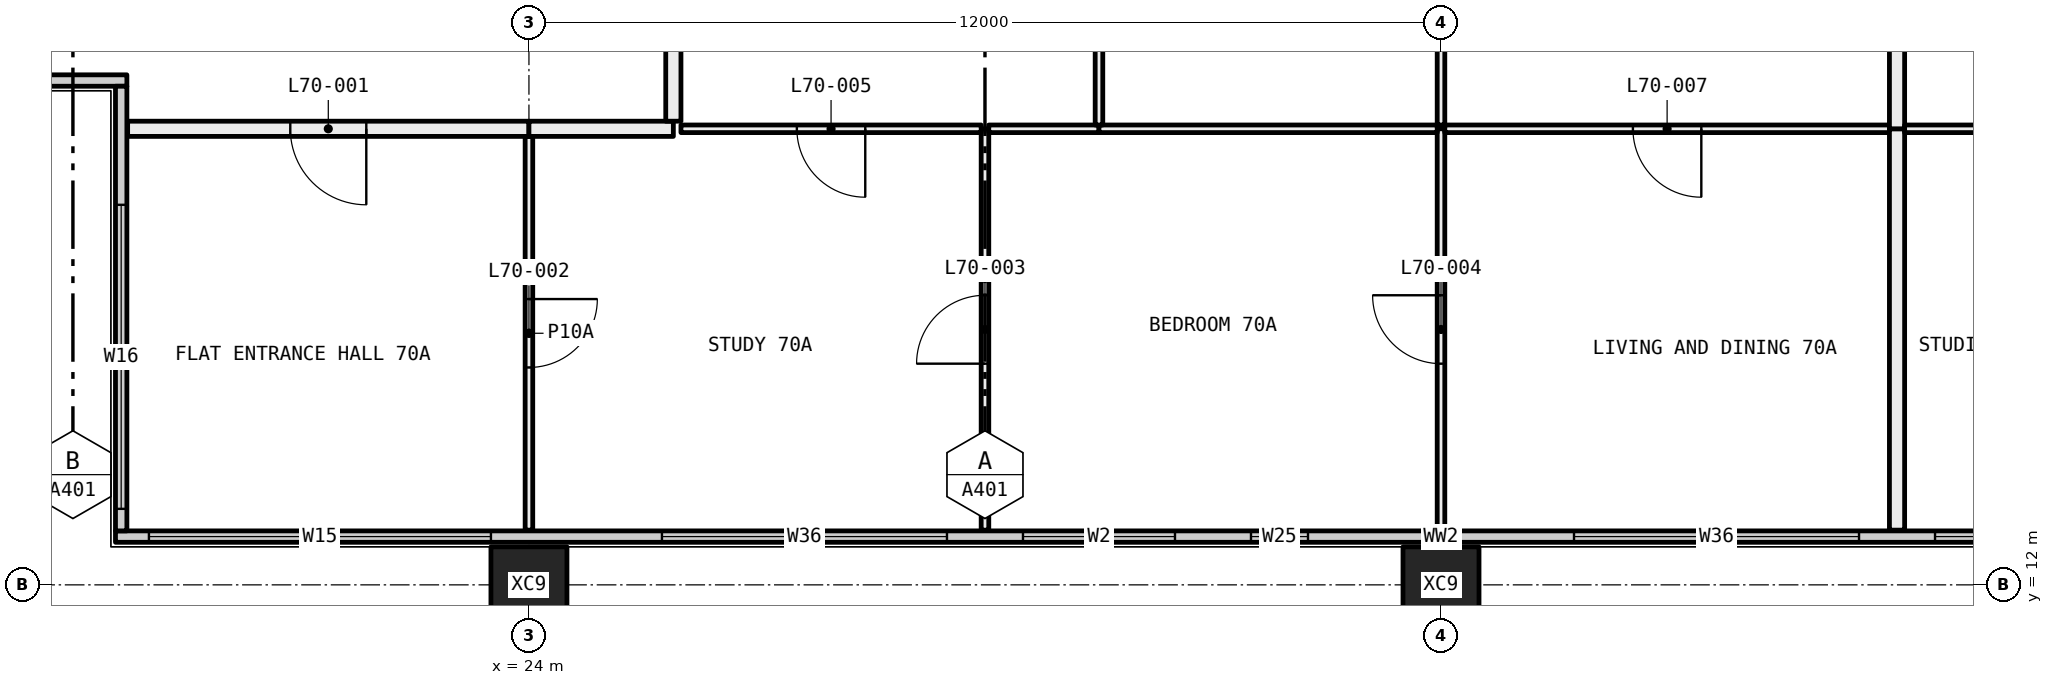
"""IFC4 building model, lengths in metres.
Left out: names, types, materials, properties, quantities, classifications, styles, units other than length and angle.
Written with IfcOpenShell. Run it as: python <this file> out.ifc"""

import sys

from ifc_helpers import new_model, si_unit, direction, frame, frame_2d, origin, origin_2d, place, context, subcontext, project, spatial, rectangle, hollow_rectangle, extrude, element, fill, save


model = new_model("IFC4")
c1 = context("Model", 3, precision=1e-05, world=origin(), true_north=direction((0.0, 1.0)))
c2 = subcontext(c1, "Body", "Model", "MODEL_VIEW")
j1 = project(units=[si_unit("LENGTHUNIT", "METRE"), si_unit("PLANEANGLEUNIT", "RADIAN")], contexts=[c1])
p1 = place(None, origin())
s1 = spatial("IfcSite", under=j1, at=p1, CompositionType="ELEMENT")
p2 = place(p1, origin())
s2 = spatial("IfcBuilding", under=s1, at=p2, CompositionType="ELEMENT")
p3 = place(p2, frame((0.0, 0.0, 259.35)))
s3 = spatial("IfcBuildingStorey", under=s2, at=p3, CompositionType="ELEMENT", Elevation=259.35)
for number, where, z_axis, x_axis in (
    (1, (24.0, 12.0, -0.4), (0.0, 0.0, 1.0), (1.0, 0.0, 0.0)),
    (2, (36.0, 12.0, -0.4), (0.0, 0.0, 1.0), (1.0, 0.0, 0.0)),
):
    element("IfcColumn", number, at=place(p3, frame(where, z_axis=z_axis, x_axis=x_axis)), inside=s3, PredefinedType="COLUMN", context=c2, shape_type="SweptSolid", body=[
        extrude(hollow_rectangle(XDim=1.0, YDim=1.0, WallThickness=0.036, at=origin_2d()), origin(), (0.0, 0.0, 1.0), 3.45),
    ])
p4 = place(p3, frame((18.56, 12.635, 0.0), z_axis=(0.0, 0.0, 1.0), x_axis=(1.0, 0.0, 0.0)))
e3 = element("IfcWall", 3, at=p4, inside=s3, PredefinedType="ELEMENTEDWALL", context=c2, shape_type="SweptSolid", body=[
    extrude(rectangle(XDim=34.88, YDim=0.15, at=frame_2d((17.44, 0.0))), origin(), (0.0, 0.0, 1.0), 3.05),
])
p5 = place(p4, frame((0.44, 0.0, 0.45)))
e4 = element("IfcOpeningElement", 4, at=p5, cuts=e3, PredefinedType="OPENING", context=c2, shape_type="SweptSolid", body=[
    extrude(rectangle(XDim=4.5, YDim=2.55, at=frame_2d((2.25, 1.275))), frame((0.0, 0.085, 0.0), z_axis=(0.0, -1.0, 0.0), x_axis=(1.0, 0.0, 0.0)), (0.0, 0.0, 1.0), 0.17),
])
p6 = place(p4, frame((7.19, 0.0, 0.45)))
e5 = element("IfcOpeningElement", 5, at=p6, cuts=e3, PredefinedType="OPENING", context=c2, shape_type="SweptSolid", body=[
    extrude(rectangle(XDim=3.75, YDim=2.55, at=frame_2d((1.875, 1.275))), frame((0.0, 0.085, 0.0), z_axis=(0.0, -1.0, 0.0), x_axis=(1.0, 0.0, 0.0)), (0.0, 0.0, 1.0), 0.17),
])
p7 = place(p4, frame((11.94, 0.0, 0.45)))
e6 = element("IfcOpeningElement", 6, at=p7, cuts=e3, PredefinedType="OPENING", context=c2, shape_type="SweptSolid", body=[
    extrude(rectangle(XDim=2.0, YDim=2.55, at=frame_2d((1.0, 1.275))), frame((0.0, 0.085, 0.0), z_axis=(0.0, -1.0, 0.0), x_axis=(1.0, 0.0, 0.0)), (0.0, 0.0, 1.0), 0.17),
])
p8 = place(p4, frame((14.94, 0.0, 0.45)))
e7 = element("IfcOpeningElement", 7, at=p8, cuts=e3, PredefinedType="OPENING", context=c2, shape_type="SweptSolid", body=[
    extrude(rectangle(XDim=0.75, YDim=2.55, at=frame_2d((0.375, 1.275))), frame((0.0, 0.085, 0.0), z_axis=(0.0, -1.0, 0.0), x_axis=(1.0, 0.0, 0.0)), (0.0, 0.0, 1.0), 0.17),
])
p9 = place(p4, frame((19.19, 0.0, 0.45)))
e8 = element("IfcOpeningElement", 8, at=p9, cuts=e3, PredefinedType="OPENING", context=c2, shape_type="SweptSolid", body=[
    extrude(rectangle(XDim=3.75, YDim=2.55, at=frame_2d((1.875, 1.275))), frame((0.0, 0.085, 0.0), z_axis=(0.0, -1.0, 0.0), x_axis=(1.0, 0.0, 0.0)), (0.0, 0.0, 1.0), 0.17),
])
p10 = place(p4, frame((23.94, 0.0, 0.45)))
e9 = element("IfcOpeningElement", 9, at=p10, cuts=e3, PredefinedType="OPENING", context=c2, shape_type="SweptSolid", body=[
    extrude(rectangle(XDim=3.75, YDim=2.55, at=frame_2d((1.875, 1.275))), frame((0.0, 0.085, 0.0), z_axis=(0.0, -1.0, 0.0), x_axis=(1.0, 0.0, 0.0)), (0.0, 0.0, 1.0), 0.17),
])
p11 = place(p4, frame((29.94, 0.0, 0.45)))
e10 = element("IfcOpeningElement", 10, at=p11, cuts=e3, PredefinedType="OPENING", context=c2, shape_type="SweptSolid", body=[
    extrude(rectangle(XDim=4.5, YDim=2.55, at=frame_2d((2.25, 1.275))), frame((0.0, 0.085, 0.0), z_axis=(0.0, -1.0, 0.0), x_axis=(1.0, 0.0, 0.0)), (0.0, 0.0, 1.0), 0.17),
])
p12 = place(p3, frame((12.56, 18.635, 0.0), z_axis=(0.0, 0.0, 1.0), x_axis=(1.0, 0.0, 0.0)))
e11 = element("IfcWall", 11, at=p12, inside=s3, PredefinedType="ELEMENTEDWALL", context=c2, shape_type="SweptSolid", body=[
    extrude(rectangle(XDim=6.15, YDim=0.15, at=frame_2d((3.075, 0.0))), origin(), (0.0, 0.0, 1.0), 3.05),
])
p13 = place(p12, frame((0.44, 0.0, 0.45)))
e12 = element("IfcOpeningElement", 12, at=p13, cuts=e11, PredefinedType="OPENING", context=c2, shape_type="SweptSolid", body=[
    extrude(rectangle(XDim=4.0, YDim=2.55, at=frame_2d((2.0, 1.275))), frame((0.0, 0.085, 0.0), z_axis=(0.0, -1.0, 0.0), x_axis=(1.0, 0.0, 0.0)), (0.0, 0.0, 1.0), 0.17),
])
p14 = place(p3, frame((18.635, 12.71, 0.0), z_axis=(0.0, 0.0, 1.0), x_axis=(0.0, 1.0, 0.0)))
e13 = element("IfcWall", 13, at=p14, inside=s3, PredefinedType="ELEMENTEDWALL", context=c2, shape_type="SweptSolid", body=[
    extrude(rectangle(XDim=5.85, YDim=0.15, at=frame_2d((2.925, 0.0))), origin(), (0.0, 0.0, 1.0), 3.05),
])
p15 = place(p14, frame((0.29, 0.0, 0.45)))
e14 = element("IfcOpeningElement", 14, at=p15, cuts=e13, PredefinedType="OPENING", context=c2, shape_type="SweptSolid", body=[
    extrude(rectangle(XDim=4.0, YDim=2.55, at=frame_2d((2.0, 1.275))), frame((0.0, 0.085, 0.0), z_axis=(0.0, -1.0, 0.0), x_axis=(1.0, 0.0, 0.0)), (0.0, 0.0, 1.0), 0.17),
])
p16 = place(p3, frame((24.0, 12.72, 0.0), z_axis=(0.0, 0.0, 1.0), x_axis=(0.0, 1.0, 0.0)))
e15 = element("IfcWall", 15, at=p16, inside=s3, PredefinedType="PARTITIONING", context=c2, shape_type="SweptSolid", body=[
    extrude(rectangle(XDim=5.18, YDim=0.1, at=frame_2d((2.59, 0.0))), origin(), (0.0, 0.0, 1.0), 3.05),
])
p17 = place(p16, frame((2.14, 0.0, 0.0)))
e16 = element("IfcOpeningElement", 16, at=p17, cuts=e15, PredefinedType="OPENING", context=c2, shape_type="SweptSolid", body=[
    extrude(rectangle(XDim=0.9, YDim=2.1, at=frame_2d((0.45, 1.05))), frame((0.0, 0.06, 0.0), z_axis=(0.0, -1.0, 0.0), x_axis=(1.0, 0.0, 0.0)), (0.0, 0.0, 1.0), 0.12),
])
p18 = place(p3, frame((24.0, 18.0, 0.0), z_axis=(0.0, 0.0, 1.0), x_axis=(-1.0, 0.0, 0.0)))
e17 = element("IfcWall", 17, at=p18, inside=s3, PredefinedType="PARTITIONING", context=c2, shape_type="SweptSolid", body=[
    extrude(rectangle(XDim=5.28, YDim=0.2, at=frame_2d((2.64, 0.0))), origin(), (0.0, 0.0, 1.0), 3.05),
])
p19 = place(p18, frame((2.14, 0.0, 0.0)))
e18 = element("IfcOpeningElement", 18, at=p19, cuts=e17, PredefinedType="OPENING", context=c2, shape_type="SweptSolid", body=[
    extrude(rectangle(XDim=1.0, YDim=2.1, at=frame_2d((0.5, 1.05))), frame((0.0, 0.11, 0.0), z_axis=(0.0, -1.0, 0.0), x_axis=(1.0, 0.0, 0.0)), (0.0, 0.0, 1.0), 0.22),
])
p20 = place(p3, frame((30.0, 12.72, 0.0), z_axis=(0.0, 0.0, 1.0), x_axis=(0.0, 1.0, 0.0)))
e19 = element("IfcWall", 19, at=p20, inside=s3, PredefinedType="PARTITIONING", context=c2, shape_type="SweptSolid", body=[
    extrude(rectangle(XDim=5.28, YDim=0.1, at=frame_2d((2.64, 0.0))), origin(), (0.0, 0.0, 1.0), 3.05),
])
p21 = place(p20, frame((2.19, 0.0, 0.0)))
e20 = element("IfcOpeningElement", 20, at=p21, cuts=e19, PredefinedType="OPENING", context=c2, shape_type="SweptSolid", body=[
    extrude(rectangle(XDim=0.9, YDim=2.1, at=frame_2d((0.45, 1.05))), frame((0.0, 0.06, 0.0), z_axis=(0.0, -1.0, 0.0), x_axis=(1.0, 0.0, 0.0)), (0.0, 0.0, 1.0), 0.12),
])
p22 = place(p3, frame((29.95, 18.0, 0.0), z_axis=(0.0, 0.0, 1.0), x_axis=(-1.0, 0.0, 0.0)))
e21 = element("IfcWall", 21, at=p22, inside=s3, PredefinedType="PARTITIONING", context=c2, shape_type="SweptSolid", body=[
    extrude(rectangle(XDim=3.95, YDim=0.1, at=frame_2d((1.975, 0.0))), origin(), (0.0, 0.0, 1.0), 3.05),
])
p23 = place(p22, frame((1.525, 0.0, 0.0)))
e22 = element("IfcOpeningElement", 22, at=p23, cuts=e21, PredefinedType="OPENING", context=c2, shape_type="SweptSolid", body=[
    extrude(rectangle(XDim=0.9, YDim=2.1, at=frame_2d((0.45, 1.05))), frame((0.0, 0.06, 0.0), z_axis=(0.0, -1.0, 0.0), x_axis=(1.0, 0.0, 0.0)), (0.0, 0.0, 1.0), 0.12),
])
p24 = place(p3, frame((25.9, 18.0, 0.0), z_axis=(0.0, 0.0, 1.0), x_axis=(-1.0, 0.0, 0.0)))
e23 = element("IfcWall", 23, at=p24, inside=s3, PredefinedType="PARTITIONING", context=c2, shape_type="SweptSolid", body=[
    extrude(rectangle(XDim=1.9, YDim=0.2, at=frame_2d((0.95, 0.0))), origin(), (0.0, 0.0, 1.0), 3.05),
])
p25 = place(p3, frame((36.0, 12.72, 0.0), z_axis=(0.0, 0.0, 1.0), x_axis=(0.0, 1.0, 0.0)))
e24 = element("IfcWall", 24, at=p25, inside=s3, PredefinedType="PARTITIONING", context=c2, shape_type="SweptSolid", body=[
    extrude(rectangle(XDim=5.28, YDim=0.1, at=frame_2d((2.64, 0.0))), origin(), (0.0, 0.0, 1.0), 2.45),
])
p26 = place(p25, frame((2.19, 0.0, 0.0)))
e25 = element("IfcOpeningElement", 25, at=p26, cuts=e24, PredefinedType="OPENING", context=c2, shape_type="SweptSolid", body=[
    extrude(rectangle(XDim=0.9, YDim=2.1, at=frame_2d((0.45, 1.05))), frame((0.0, 0.06, 0.0), z_axis=(0.0, -1.0, 0.0), x_axis=(1.0, 0.0, 0.0)), (0.0, 0.0, 1.0), 0.12),
])
p27 = place(p3, frame((31.5, 18.0, 0.0), z_axis=(0.0, 0.0, 1.0), x_axis=(-1.0, 0.0, 0.0)))
e26 = element("IfcWall", 26, at=p27, inside=s3, PredefinedType="PARTITIONING", context=c2, shape_type="SweptSolid", body=[
    extrude(rectangle(XDim=1.45, YDim=0.1, at=frame_2d((0.725, 0.0))), origin(), (0.0, 0.0, 1.0), 3.05),
])
p28 = place(p3, frame((35.95, 18.0, 0.0), z_axis=(0.0, 0.0, 1.0), x_axis=(-1.0, 0.0, 0.0)))
e27 = element("IfcWall", 27, at=p28, inside=s3, PredefinedType="PARTITIONING", context=c2, shape_type="SweptSolid", body=[
    extrude(rectangle(XDim=4.45, YDim=0.1, at=frame_2d((2.225, 0.0))), origin(), (0.0, 0.0, 1.0), 2.45),
])
p29 = place(p3, frame((41.9, 18.0, 0.0), z_axis=(0.0, 0.0, 1.0), x_axis=(-1.0, 0.0, 0.0)))
e28 = element("IfcWall", 28, at=p29, inside=s3, PredefinedType="PARTITIONING", context=c2, shape_type="SweptSolid", body=[
    extrude(rectangle(XDim=5.85, YDim=0.1, at=frame_2d((2.925, 0.0))), origin(), (0.0, 0.0, 1.0), 2.45),
])
p30 = place(p29, frame((2.475, 0.0, 0.0)))
e29 = element("IfcOpeningElement", 29, at=p30, cuts=e28, PredefinedType="OPENING", context=c2, shape_type="SweptSolid", body=[
    extrude(rectangle(XDim=0.9, YDim=2.1, at=frame_2d((0.45, 1.05))), frame((0.0, 0.06, 0.0), z_axis=(0.0, -1.0, 0.0), x_axis=(1.0, 0.0, 0.0)), (0.0, 0.0, 1.0), 0.12),
])
p31 = place(p3, frame((42.0, 12.72, 0.0), z_axis=(0.0, 0.0, 1.0), x_axis=(0.0, 1.0, 0.0)))
e30 = element("IfcWall", 30, at=p31, inside=s3, PredefinedType="PARTITIONING", context=c2, shape_type="SweptSolid", body=[
    extrude(rectangle(XDim=5.28, YDim=0.2, at=frame_2d((2.64, 0.0))), origin(), (0.0, 0.0, 1.0), 3.05),
])
p32 = place(p3, frame((31.5, 18.05, 0.0), z_axis=(0.0, 0.0, 1.0), x_axis=(0.0, 1.0, 0.0)))
e31 = element("IfcWall", 31, at=p32, inside=s3, PredefinedType="PARTITIONING", context=c2, shape_type="SweptSolid", body=[
    extrude(rectangle(XDim=6.25, YDim=0.1, at=frame_2d((3.125, 0.0))), origin(), (0.0, 0.0, 1.0), 2.45),
])
p33 = place(p32, frame((2.675, 0.0, 0.0)))
e32 = element("IfcOpeningElement", 32, at=p33, cuts=e31, PredefinedType="OPENING", context=c2, shape_type="SweptSolid", body=[
    extrude(rectangle(XDim=0.9, YDim=2.1, at=frame_2d((0.45, 1.05))), frame((0.0, 0.06, 0.0), z_axis=(0.0, -1.0, 0.0), x_axis=(1.0, 0.0, 0.0)), (0.0, 0.0, 1.0), 0.12),
])
p34 = place(p3, frame((25.9, 23.9, 0.0), z_axis=(0.0, 0.0, 1.0), x_axis=(0.0, -1.0, 0.0)))
e33 = element("IfcWall", 33, at=p34, inside=s3, PredefinedType="PARTITIONING", context=c2, shape_type="SweptSolid", body=[
    extrude(rectangle(XDim=5.8, YDim=0.2, at=frame_2d((2.9, 0.0))), origin(), (0.0, 0.0, 1.0), 3.05),
])
p35 = place(p3, frame((36.0, 18.05, 0.0), z_axis=(0.0, 0.0, 1.0), x_axis=(0.0, 1.0, 0.0)))
e34 = element("IfcWall", 34, at=p35, inside=s3, PredefinedType="PARTITIONING", context=c2, shape_type="SweptSolid", body=[
    extrude(rectangle(XDim=5.4, YDim=0.1, at=frame_2d((2.7, 0.0))), origin(), (0.0, 0.0, 1.0), 2.45),
])
p36 = place(p3, frame((42.0, 18.0, 0.0), z_axis=(0.0, 0.0, 1.0), x_axis=(0.0, 1.0, 0.0)))
e35 = element("IfcWall", 35, at=p36, inside=s3, PredefinedType="PARTITIONING", context=c2, shape_type="SweptSolid", body=[
    extrude(rectangle(XDim=6.3, YDim=0.2, at=frame_2d((3.15, 0.0))), origin(), (0.0, 0.0, 1.0), 2.45),
])
p37 = place(p3, frame((46.0, 18.0, 0.0), z_axis=(0.0, 0.0, 1.0), x_axis=(-1.0, 0.0, 0.0)))
e36 = element("IfcWall", 36, at=p37, inside=s3, PredefinedType="PARTITIONING", context=c2, shape_type="SweptSolid", body=[
    extrude(rectangle(XDim=3.9, YDim=0.1, at=frame_2d((1.95, 0.0))), origin(), (0.0, 0.0, 1.0), 3.05),
])
p38 = place(p37, frame((1.5, 0.0, 0.0)))
e37 = element("IfcOpeningElement", 37, at=p38, cuts=e36, PredefinedType="OPENING", context=c2, shape_type="SweptSolid", body=[
    extrude(rectangle(XDim=0.9, YDim=2.1, at=frame_2d((0.45, 1.05))), frame((0.0, 0.06, 0.0), z_axis=(0.0, -1.0, 0.0), x_axis=(1.0, 0.0, 0.0)), (0.0, 0.0, 1.0), 0.12),
])
p39 = place(p5, origin())
e38 = element("IfcWindow", 38, at=p39, inside=s3, PartitioningType="SINGLE_PANEL", PredefinedType="WINDOW", context=c2, shape_type="SweptSolid", body=[
    extrude(rectangle(XDim=4.5, YDim=2.55, at=frame_2d((2.25, 1.275))), frame((0.0, 0.03, 0.0), z_axis=(0.0, -1.0, 0.0), x_axis=(1.0, 0.0, 0.0)), (0.0, 0.0, 1.0), 0.06),
])
fill(e4, e38)
p40 = place(p6, origin())
e39 = element("IfcWindow", 39, at=p40, inside=s3, PartitioningType="SINGLE_PANEL", PredefinedType="WINDOW", context=c2, shape_type="SweptSolid", body=[
    extrude(rectangle(XDim=3.75, YDim=2.55, at=frame_2d((1.875, 1.275))), frame((0.0, 0.03, 0.0), z_axis=(0.0, -1.0, 0.0), x_axis=(1.0, 0.0, 0.0)), (0.0, 0.0, 1.0), 0.06),
])
fill(e5, e39)
p41 = place(p7, origin())
e40 = element("IfcWindow", 40, at=p41, inside=s3, PartitioningType="SINGLE_PANEL", PredefinedType="WINDOW", context=c2, shape_type="SweptSolid", body=[
    extrude(rectangle(XDim=2.0, YDim=2.55, at=frame_2d((1.0, 1.275))), frame((0.0, 0.03, 0.0), z_axis=(0.0, -1.0, 0.0), x_axis=(1.0, 0.0, 0.0)), (0.0, 0.0, 1.0), 0.06),
])
fill(e6, e40)
p42 = place(p8, origin())
e41 = element("IfcWindow", 41, at=p42, inside=s3, PartitioningType="SINGLE_PANEL", PredefinedType="WINDOW", context=c2, shape_type="SweptSolid", body=[
    extrude(rectangle(XDim=0.75, YDim=2.55, at=frame_2d((0.375, 1.275))), frame((0.0, 0.03, 0.0), z_axis=(0.0, -1.0, 0.0), x_axis=(1.0, 0.0, 0.0)), (0.0, 0.0, 1.0), 0.06),
])
fill(e7, e41)
p43 = place(p9, origin())
e42 = element("IfcWindow", 42, at=p43, inside=s3, PartitioningType="SINGLE_PANEL", PredefinedType="WINDOW", context=c2, shape_type="SweptSolid", body=[
    extrude(rectangle(XDim=3.75, YDim=2.55, at=frame_2d((1.875, 1.275))), frame((0.0, 0.03, 0.0), z_axis=(0.0, -1.0, 0.0), x_axis=(1.0, 0.0, 0.0)), (0.0, 0.0, 1.0), 0.06),
])
fill(e8, e42)
p44 = place(p10, origin())
e43 = element("IfcWindow", 43, at=p44, inside=s3, PartitioningType="SINGLE_PANEL", PredefinedType="WINDOW", context=c2, shape_type="SweptSolid", body=[
    extrude(rectangle(XDim=3.75, YDim=2.55, at=frame_2d((1.875, 1.275))), frame((0.0, 0.03, 0.0), z_axis=(0.0, -1.0, 0.0), x_axis=(1.0, 0.0, 0.0)), (0.0, 0.0, 1.0), 0.06),
])
fill(e9, e43)
p45 = place(p15, origin())
e44 = element("IfcWindow", 44, at=p45, inside=s3, PartitioningType="SINGLE_PANEL", PredefinedType="WINDOW", context=c2, shape_type="SweptSolid", body=[
    extrude(rectangle(XDim=4.0, YDim=2.55, at=frame_2d((2.0, 1.275))), frame((0.0, 0.03, 0.0), z_axis=(0.0, -1.0, 0.0), x_axis=(1.0, 0.0, 0.0)), (0.0, 0.0, 1.0), 0.06),
])
fill(e14, e44)
p46 = place(p19, origin())
e45 = element("IfcDoor", 45, at=p46, inside=s3, OperationType="SINGLE_SWING_RIGHT", PredefinedType="DOOR", context=c2, shape_type="SweptSolid", body=[
    extrude(rectangle(XDim=1.0, YDim=2.1, at=frame_2d((0.5, 1.05))), frame((0.0, 0.025, 0.0), z_axis=(0.0, -1.0, 0.0), x_axis=(1.0, 0.0, 0.0)), (0.0, 0.0, 1.0), 0.05),
])
fill(e18, e45)
p47 = place(p17, frame((0.9, 0.0, 0.0), x_axis=(-1.0, 0.0, 0.0)))
e46 = element("IfcDoor", 46, at=p47, inside=s3, OperationType="SINGLE_SWING_RIGHT", PredefinedType="DOOR", context=c2, shape_type="SweptSolid", body=[
    extrude(rectangle(XDim=0.9, YDim=2.1, at=frame_2d((0.45, 1.05))), frame((0.0, 0.025, 0.0), z_axis=(0.0, -1.0, 0.0), x_axis=(1.0, 0.0, 0.0)), (0.0, 0.0, 1.0), 0.05),
])
fill(e16, e46)
p48 = place(p21, origin())
e47 = element("IfcDoor", 47, at=p48, inside=s3, OperationType="SINGLE_SWING_RIGHT", PredefinedType="DOOR", context=c2, shape_type="SweptSolid", body=[
    extrude(rectangle(XDim=0.9, YDim=2.1, at=frame_2d((0.45, 1.05))), frame((0.0, 0.025, 0.0), z_axis=(0.0, -1.0, 0.0), x_axis=(1.0, 0.0, 0.0)), (0.0, 0.0, 1.0), 0.05),
])
fill(e20, e47)
p49 = place(p26, origin())
e48 = element("IfcDoor", 48, at=p49, inside=s3, OperationType="SINGLE_SWING_LEFT", PredefinedType="DOOR", context=c2, shape_type="SweptSolid", body=[
    extrude(rectangle(XDim=0.9, YDim=2.1, at=frame_2d((0.45, 1.05))), frame((0.0, 0.025, 0.0), z_axis=(0.0, -1.0, 0.0), x_axis=(1.0, 0.0, 0.0)), (0.0, 0.0, 1.0), 0.05),
])
fill(e25, e48)
p50 = place(p23, origin())
e49 = element("IfcDoor", 49, at=p50, inside=s3, OperationType="SINGLE_SWING_RIGHT", PredefinedType="DOOR", context=c2, shape_type="SweptSolid", body=[
    extrude(rectangle(XDim=0.9, YDim=2.1, at=frame_2d((0.45, 1.05))), frame((0.0, 0.025, 0.0), z_axis=(0.0, -1.0, 0.0), x_axis=(1.0, 0.0, 0.0)), (0.0, 0.0, 1.0), 0.05),
])
fill(e22, e49)
p51 = place(p30, origin())
e50 = element("IfcDoor", 50, at=p51, inside=s3, OperationType="SINGLE_SWING_RIGHT", PredefinedType="DOOR", context=c2, shape_type="SweptSolid", body=[
    extrude(rectangle(XDim=0.9, YDim=2.1, at=frame_2d((0.45, 1.05))), frame((0.0, 0.025, 0.0), z_axis=(0.0, -1.0, 0.0), x_axis=(1.0, 0.0, 0.0)), (0.0, 0.0, 1.0), 0.05),
])
fill(e29, e50)
save(model, sys.argv[1])
